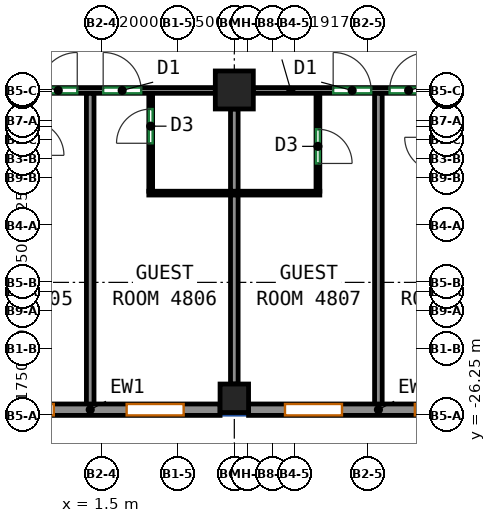
"""IFC4 building model, lengths in metres.
Left out: names, types, materials, properties, quantities, classifications, styles, units other than length and angle.
Written with IfcOpenShell. Run it as: python <this file> out.ifc"""

import sys

from ifc_helpers import new_model, si_unit, direction, frame, frame_2d, origin, origin_2d, place, context, subcontext, project, spatial, rectangle, extrude, source, transform, mapped, element, fill, save


model = new_model("IFC4")
c1 = context("Model", 3, precision=1e-05, world=origin(), true_north=direction((0.0, 1.0)))
c2 = subcontext(c1, "Body", "Model", "MODEL_VIEW")
j1 = project(units=[si_unit("LENGTHUNIT", "METRE"), si_unit("PLANEANGLEUNIT", "RADIAN")], contexts=[c1])
p1 = place(None, origin())
s1 = spatial("IfcSite", under=j1, at=p1, CompositionType="ELEMENT")
p2 = place(p1, origin())
s2 = spatial("IfcBuilding", under=s1, at=p2, CompositionType="ELEMENT")
p3 = place(p2, frame((0.0, 0.0, 199.9)))
s3 = spatial("IfcBuildingStorey", under=s2, at=p3, CompositionType="ELEMENT", Elevation=199.9)
m1 = source(origin(), c2, "Body", "SweptSolid", [
    extrude(rectangle(XDim=0.75, YDim=0.75, at=origin_2d()), origin(), (0.0, 0.0, 1.0), 3.12),
])
p4 = place(p3, frame((5.0, -25.8, 0.0), z_axis=(0.0, 0.0, 1.0), x_axis=(1.0, 0.0, 0.0)))
e1 = element("IfcColumn", 1, at=p4, inside=s3, PredefinedType="COLUMN", context=c2, shape_type="MappedRepresentation", body=[
    mapped(m1, transform((0.0, 0.0, 0.0))),
])
m2 = source(origin(), c2, "Body", "SweptSolid", [
    extrude(rectangle(XDim=1.0, YDim=1.0, at=origin_2d()), origin(), (0.0, 0.0, 1.0), 3.12),
])
p5 = place(p3, frame((5.0, -17.688, 0.0), z_axis=(0.0, 0.0, 1.0), x_axis=(1.0, 0.0, 0.0)))
e2 = element("IfcColumn", 2, at=p5, inside=s3, PredefinedType="COLUMN", context=c2, shape_type="MappedRepresentation", body=[
    mapped(m2, transform((0.0, 0.0, 0.0))),
])
m3 = source(origin(), c2, "Body", "SweptSolid", [
    extrude(rectangle(XDim=6.833, YDim=0.3, at=frame_2d((3.417, 0.0))), origin(), (0.0, 0.0, 1.0), 3.12),
])
p6 = place(p3, frame((-2.208, -26.1, 0.0), z_axis=(0.0, 0.0, 1.0), x_axis=(1.0, 0.0, 0.0)))
e3 = element("IfcWall", 3, at=p6, inside=s3, PredefinedType="SOLIDWALL", context=c2, shape_type="MappedRepresentation", body=[
    mapped(m3, transform((0.0, 0.0, 0.0))),
])
p7 = place(p6, frame((0.958, 0.0, 0.85)))
e4 = element("IfcOpeningElement", 4, at=p7, cuts=e3, PredefinedType="OPENING", context=c2, shape_type="SweptSolid", body=[
    extrude(rectangle(XDim=1.5, YDim=1.95, at=frame_2d((0.75, 0.975))), frame((0.0, 0.16, 0.0), z_axis=(0.0, -1.0, 0.0), x_axis=(1.0, 0.0, 0.0)), (0.0, 0.0, 1.0), 0.32),
])
p8 = place(p6, frame((4.375, 0.0, 0.85)))
e5 = element("IfcOpeningElement", 5, at=p8, cuts=e3, PredefinedType="OPENING", context=c2, shape_type="SweptSolid", body=[
    extrude(rectangle(XDim=1.5, YDim=1.95, at=frame_2d((0.75, 0.975))), frame((0.0, 0.16, 0.0), z_axis=(0.0, -1.0, 0.0), x_axis=(1.0, 0.0, 0.0)), (0.0, 0.0, 1.0), 0.32),
])
p9 = place(p3, frame((5.375, -26.1, 0.0), z_axis=(0.0, 0.0, 1.0), x_axis=(1.0, 0.0, 0.0)))
e6 = element("IfcWall", 6, at=p9, inside=s3, PredefinedType="SOLIDWALL", context=c2, shape_type="MappedRepresentation", body=[
    mapped(m3, transform((0.0, 0.0, 0.0))),
])
p10 = place(p9, frame((0.958, 0.0, 0.85)))
e7 = element("IfcOpeningElement", 7, at=p10, cuts=e6, PredefinedType="OPENING", context=c2, shape_type="SweptSolid", body=[
    extrude(rectangle(XDim=1.5, YDim=1.95, at=frame_2d((0.75, 0.975))), frame((0.0, 0.16, 0.0), z_axis=(0.0, -1.0, 0.0), x_axis=(1.0, 0.0, 0.0)), (0.0, 0.0, 1.0), 0.32),
])
p11 = place(p9, frame((4.375, 0.0, 0.85)))
e8 = element("IfcOpeningElement", 8, at=p11, cuts=e6, PredefinedType="OPENING", context=c2, shape_type="SweptSolid", body=[
    extrude(rectangle(XDim=1.5, YDim=1.95, at=frame_2d((0.75, 0.975))), frame((0.0, 0.16, 0.0), z_axis=(0.0, -1.0, 0.0), x_axis=(1.0, 0.0, 0.0)), (0.0, 0.0, 1.0), 0.32),
])
p12 = place(p3, frame((-2.083, -17.7, 0.0), z_axis=(0.0, 0.0, 1.0), x_axis=(1.0, 0.0, 0.0)))
e9 = element("IfcWall", 9, at=p12, inside=s3, PredefinedType="PARTITIONING", context=c2, shape_type="SweptSolid", body=[
    extrude(rectangle(XDim=6.583, YDim=0.15, at=frame_2d((3.292, 0.0))), origin(), (0.0, 0.0, 1.0), 3.12),
])
p13 = place(p12, frame((1.95, 0.0, 0.0)))
e10 = element("IfcOpeningElement", 10, at=p13, cuts=e9, PredefinedType="OPENING", context=c2, shape_type="SweptSolid", body=[
    extrude(rectangle(XDim=1.0, YDim=2.1, at=frame_2d((0.5, 1.05))), frame((0.0, 0.085, 0.0), z_axis=(0.0, -1.0, 0.0), x_axis=(1.0, 0.0, 0.0)), (0.0, 0.0, 1.0), 0.17),
])
p14 = place(p12, frame((3.632, 0.0, 0.0)))
e11 = element("IfcOpeningElement", 11, at=p14, cuts=e9, PredefinedType="OPENING", context=c2, shape_type="SweptSolid", body=[
    extrude(rectangle(XDim=1.0, YDim=2.1, at=frame_2d((0.5, 1.05))), frame((0.0, 0.085, 0.0), z_axis=(0.0, -1.0, 0.0), x_axis=(1.0, 0.0, 0.0)), (0.0, 0.0, 1.0), 0.17),
])
p15 = place(p3, frame((5.5, -17.7, 0.0), z_axis=(0.0, 0.0, 1.0), x_axis=(1.0, 0.0, 0.0)))
e12 = element("IfcWall", 12, at=p15, inside=s3, PredefinedType="PARTITIONING", context=c2, shape_type="SweptSolid", body=[
    extrude(rectangle(XDim=6.583, YDim=0.15, at=frame_2d((3.292, 0.0))), origin(), (0.0, 0.0, 1.0), 3.12),
])
p16 = place(p15, frame((2.101, 0.0, 0.0)))
e13 = element("IfcOpeningElement", 13, at=p16, cuts=e12, PredefinedType="OPENING", context=c2, shape_type="SweptSolid", body=[
    extrude(rectangle(XDim=1.0, YDim=2.1, at=frame_2d((0.5, 1.05))), frame((0.0, 0.085, 0.0), z_axis=(0.0, -1.0, 0.0), x_axis=(1.0, 0.0, 0.0)), (0.0, 0.0, 1.0), 0.17),
])
p17 = place(p15, frame((3.587, 0.0, 0.0)))
e14 = element("IfcOpeningElement", 14, at=p17, cuts=e12, PredefinedType="OPENING", context=c2, shape_type="SweptSolid", body=[
    extrude(rectangle(XDim=1.0, YDim=2.1, at=frame_2d((0.5, 1.05))), frame((0.0, 0.085, 0.0), z_axis=(0.0, -1.0, 0.0), x_axis=(1.0, 0.0, 0.0)), (0.0, 0.0, 1.0), 0.17),
])
p18 = place(p3, frame((1.208, -26.0, 0.0), z_axis=(0.0, 0.0, 1.0), x_axis=(0.0, 1.0, 0.0)))
e15 = element("IfcWall", 15, at=p18, inside=s3, PredefinedType="PARTITIONING", context=c2, shape_type="SweptSolid", body=[
    extrude(rectangle(XDim=8.223, YDim=0.2, at=frame_2d((4.111, 0.0))), origin(), (0.0, 0.0, 1.0), 3.12),
])
p19 = place(p3, frame((2.8, -20.352, 0.0), z_axis=(0.0, 0.0, 1.0), x_axis=(0.0, 1.0, 0.0)))
e16 = element("IfcWall", 16, at=p19, inside=s3, PredefinedType="PARTITIONING", context=c2, shape_type="SweptSolid", body=[
    extrude(rectangle(XDim=2.575, YDim=0.1, at=frame_2d((1.288, 0.0))), origin(), (0.0, 0.0, 1.0), 3.12),
])
p20 = place(p19, frame((1.262, 0.0, 0.0)))
e17 = element("IfcOpeningElement", 17, at=p20, cuts=e16, PredefinedType="OPENING", context=c2, shape_type="SweptSolid", body=[
    extrude(rectangle(XDim=0.9, YDim=2.1, at=frame_2d((0.45, 1.05))), frame((0.0, 0.06, 0.0), z_axis=(0.0, -1.0, 0.0), x_axis=(1.0, 0.0, 0.0)), (0.0, 0.0, 1.0), 0.12),
])
p21 = place(p3, frame((2.75, -20.402, 0.0), z_axis=(0.0, 0.0, 1.0), x_axis=(1.0, 0.0, 0.0)))
e18 = element("IfcWall", 18, at=p21, inside=s3, PredefinedType="PARTITIONING", context=c2, shape_type="SweptSolid", body=[
    extrude(rectangle(XDim=4.5, YDim=0.1, at=frame_2d((2.25, 0.0))), origin(), (0.0, 0.0, 1.0), 3.12),
])
p22 = place(p3, frame((5.0, -25.425, 0.0), z_axis=(0.0, 0.0, 1.0), x_axis=(0.0, 1.0, 0.0)))
e19 = element("IfcWall", 19, at=p22, inside=s3, PredefinedType="PARTITIONING", context=c2, shape_type="SweptSolid", body=[
    extrude(rectangle(XDim=4.973, YDim=0.2, at=frame_2d((2.487, 0.0))), origin(), (0.0, 0.0, 1.0), 3.12),
])
p23 = place(p3, frame((5.0, -20.352, 0.0), z_axis=(0.0, 0.0, 1.0), x_axis=(0.0, 1.0, 0.0)))
e20 = element("IfcWall", 20, at=p23, inside=s3, PredefinedType="PARTITIONING", context=c2, shape_type="SweptSolid", body=[
    extrude(rectangle(XDim=2.164, YDim=0.2, at=frame_2d((1.082, 0.0))), origin(), (0.0, 0.0, 1.0), 3.12),
])
p24 = place(p3, frame((7.2, -17.777, 0.0), z_axis=(0.0, 0.0, 1.0), x_axis=(0.0, -1.0, 0.0)))
e21 = element("IfcWall", 21, at=p24, inside=s3, PredefinedType="PARTITIONING", context=c2, shape_type="SweptSolid", body=[
    extrude(rectangle(XDim=2.575, YDim=0.1, at=frame_2d((1.288, 0.0))), origin(), (0.0, 0.0, 1.0), 3.12),
])
p25 = place(p24, frame((0.944, 0.0, 0.0)))
e22 = element("IfcOpeningElement", 22, at=p25, cuts=e21, PredefinedType="OPENING", context=c2, shape_type="SweptSolid", body=[
    extrude(rectangle(XDim=0.9, YDim=2.1, at=frame_2d((0.45, 1.05))), frame((0.0, 0.06, 0.0), z_axis=(0.0, -1.0, 0.0), x_axis=(1.0, 0.0, 0.0)), (0.0, 0.0, 1.0), 0.12),
])
p26 = place(p3, frame((8.791, -26.0, 0.0), z_axis=(0.0, 0.0, 1.0), x_axis=(0.0, 1.0, 0.0)))
e23 = element("IfcWall", 23, at=p26, inside=s3, PredefinedType="PARTITIONING", context=c2, shape_type="SweptSolid", body=[
    extrude(rectangle(XDim=8.223, YDim=0.2, at=frame_2d((4.111, 0.0))), origin(), (0.0, 0.0, 1.0), 3.12),
])
p27 = place(p7, origin())
e24 = element("IfcWindow", 24, at=p27, inside=s3, PartitioningType="SINGLE_PANEL", PredefinedType="WINDOW", context=c2, shape_type="SweptSolid", body=[
    extrude(rectangle(XDim=1.5, YDim=1.95, at=frame_2d((0.75, 0.975))), frame((0.0, 0.03, 0.0), z_axis=(0.0, -1.0, 0.0), x_axis=(1.0, 0.0, 0.0)), (0.0, 0.0, 1.0), 0.06),
])
fill(e4, e24)
p28 = place(p8, origin())
e25 = element("IfcWindow", 25, at=p28, inside=s3, PartitioningType="SINGLE_PANEL", PredefinedType="WINDOW", context=c2, shape_type="SweptSolid", body=[
    extrude(rectangle(XDim=1.5, YDim=1.95, at=frame_2d((0.75, 0.975))), frame((0.0, 0.03, 0.0), z_axis=(0.0, -1.0, 0.0), x_axis=(1.0, 0.0, 0.0)), (0.0, 0.0, 1.0), 0.06),
])
fill(e5, e25)
p29 = place(p10, origin())
e26 = element("IfcWindow", 26, at=p29, inside=s3, PartitioningType="SINGLE_PANEL", PredefinedType="WINDOW", context=c2, shape_type="SweptSolid", body=[
    extrude(rectangle(XDim=1.5, YDim=1.95, at=frame_2d((0.75, 0.975))), frame((0.0, 0.03, 0.0), z_axis=(0.0, -1.0, 0.0), x_axis=(1.0, 0.0, 0.0)), (0.0, 0.0, 1.0), 0.06),
])
fill(e7, e26)
p30 = place(p11, origin())
e27 = element("IfcWindow", 27, at=p30, inside=s3, PartitioningType="SINGLE_PANEL", PredefinedType="WINDOW", context=c2, shape_type="SweptSolid", body=[
    extrude(rectangle(XDim=1.5, YDim=1.95, at=frame_2d((0.75, 0.975))), frame((0.0, 0.03, 0.0), z_axis=(0.0, -1.0, 0.0), x_axis=(1.0, 0.0, 0.0)), (0.0, 0.0, 1.0), 0.06),
])
fill(e8, e27)
p31 = place(p25, origin())
e28 = element("IfcDoor", 28, at=p31, inside=s3, OperationType="SINGLE_SWING_RIGHT", PredefinedType="DOOR", context=c2, shape_type="SweptSolid", body=[
    extrude(rectangle(XDim=0.9, YDim=2.1, at=frame_2d((0.45, 1.05))), frame((0.0, 0.025, 0.0), z_axis=(0.0, -1.0, 0.0), x_axis=(1.0, 0.0, 0.0)), (0.0, 0.0, 1.0), 0.05),
])
fill(e22, e28)
p32 = place(p20, origin())
e29 = element("IfcDoor", 29, at=p32, inside=s3, OperationType="SINGLE_SWING_LEFT", PredefinedType="DOOR", context=c2, shape_type="SweptSolid", body=[
    extrude(rectangle(XDim=0.9, YDim=2.1, at=frame_2d((0.45, 1.05))), frame((0.0, 0.025, 0.0), z_axis=(0.0, -1.0, 0.0), x_axis=(1.0, 0.0, 0.0)), (0.0, 0.0, 1.0), 0.05),
])
fill(e17, e29)
p33 = place(p13, origin())
e30 = element("IfcDoor", 30, at=p33, inside=s3, OperationType="SINGLE_SWING_RIGHT", PredefinedType="DOOR", context=c2, shape_type="SweptSolid", body=[
    extrude(rectangle(XDim=1.0, YDim=2.1, at=frame_2d((0.5, 1.05))), frame((0.0, 0.025, 0.0), z_axis=(0.0, -1.0, 0.0), x_axis=(1.0, 0.0, 0.0)), (0.0, 0.0, 1.0), 0.05),
])
fill(e10, e30)
p34 = place(p14, origin())
e31 = element("IfcDoor", 31, at=p34, inside=s3, OperationType="SINGLE_SWING_LEFT", PredefinedType="DOOR", context=c2, shape_type="SweptSolid", body=[
    extrude(rectangle(XDim=1.0, YDim=2.1, at=frame_2d((0.5, 1.05))), frame((0.0, 0.025, 0.0), z_axis=(0.0, -1.0, 0.0), x_axis=(1.0, 0.0, 0.0)), (0.0, 0.0, 1.0), 0.05),
])
fill(e11, e31)
p35 = place(p16, origin())
e32 = element("IfcDoor", 32, at=p35, inside=s3, OperationType="SINGLE_SWING_LEFT", PredefinedType="DOOR", context=c2, shape_type="SweptSolid", body=[
    extrude(rectangle(XDim=1.0, YDim=2.1, at=frame_2d((0.5, 1.05))), frame((0.0, 0.025, 0.0), z_axis=(0.0, -1.0, 0.0), x_axis=(1.0, 0.0, 0.0)), (0.0, 0.0, 1.0), 0.05),
])
fill(e13, e32)
p36 = place(p17, origin())
e33 = element("IfcDoor", 33, at=p36, inside=s3, OperationType="SINGLE_SWING_RIGHT", PredefinedType="DOOR", context=c2, shape_type="SweptSolid", body=[
    extrude(rectangle(XDim=1.0, YDim=2.1, at=frame_2d((0.5, 1.05))), frame((0.0, 0.025, 0.0), z_axis=(0.0, -1.0, 0.0), x_axis=(1.0, 0.0, 0.0)), (0.0, 0.0, 1.0), 0.05),
])
fill(e14, e33)
save(model, sys.argv[1])
